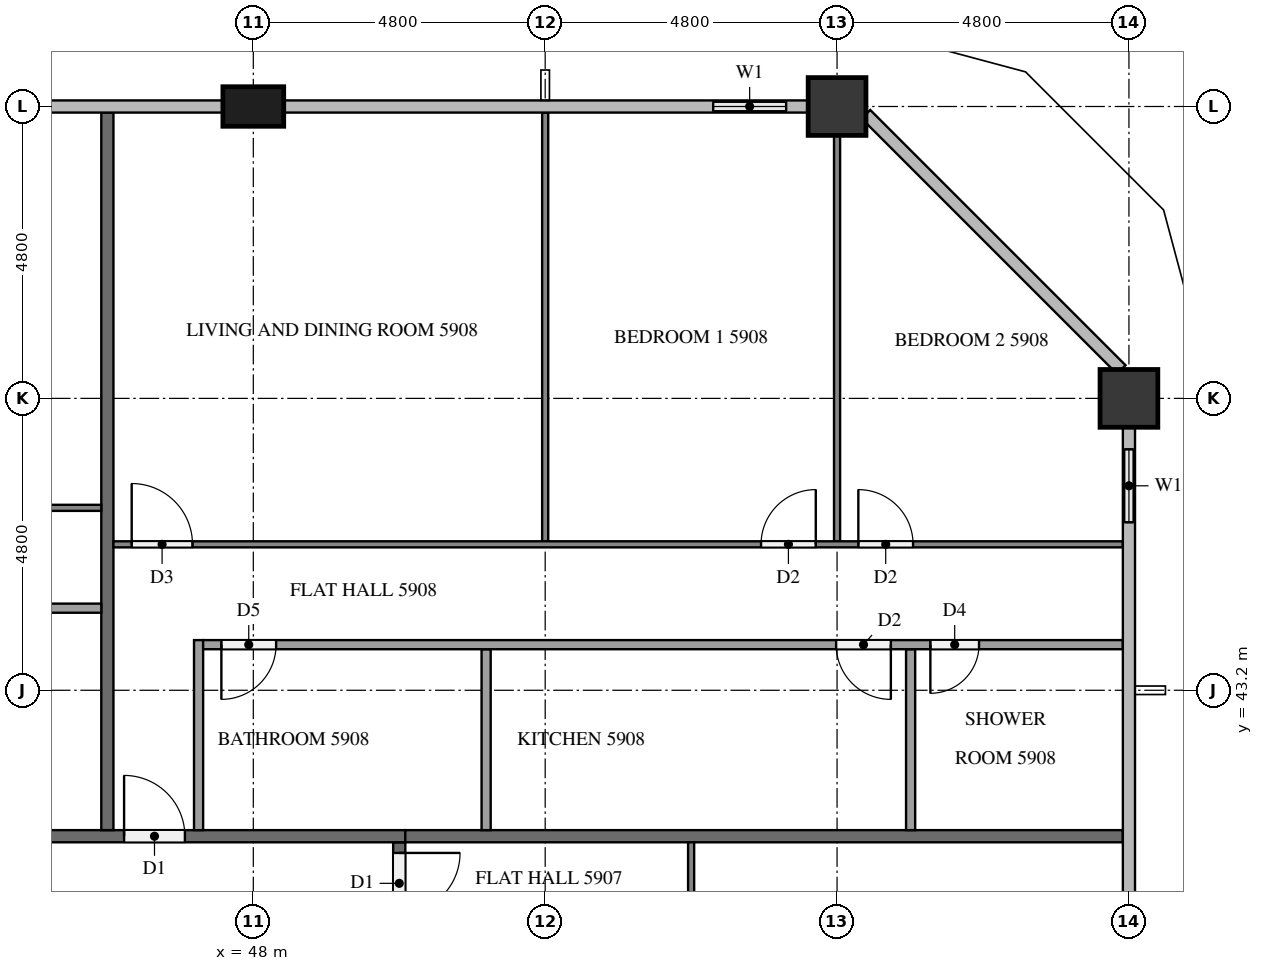
"""IFC4 building model, lengths in metres.
Left out: names, types, materials, properties, quantities, classifications, styles, units other than length and angle.
Written with IfcOpenShell. Run it as: python <this file> out.ifc"""

import sys

from ifc_helpers import new_model, si_unit, direction, frame, frame_2d, origin, origin_2d, place, context, subcontext, project, spatial, rectangle, extrude, element, fill, save


model = new_model("IFC4")
c1 = context("Model", 3, precision=1e-05, world=origin(), true_north=direction((0.0, 1.0)))
c2 = subcontext(c1, "Body", "Model", "MODEL_VIEW")
j1 = project(units=[si_unit("LENGTHUNIT", "METRE"), si_unit("PLANEANGLEUNIT", "RADIAN")], contexts=[c1])
p1 = place(None, origin())
s1 = spatial("IfcSite", under=j1, at=p1, CompositionType="ELEMENT")
p2 = place(p1, origin())
s2 = spatial("IfcBuilding", under=s1, at=p2, CompositionType="ELEMENT")
p3 = place(p2, frame((0.0, 0.0, 226.3)))
s3 = spatial("IfcBuildingStorey", under=s2, at=p3, CompositionType="ELEMENT", Elevation=226.3)
for number, where, z_axis, x_axis in (
    (1, (62.4, 48.0, 0.0), (0.0, 0.0, 1.0), (1.0, 0.0, 0.0)),
    (2, (57.6, 52.8, 0.0), (0.0, 0.0, 1.0), (1.0, 0.0, 0.0)),
):
    element("IfcColumn", number, at=place(p3, frame(where, z_axis=z_axis, x_axis=x_axis)), inside=s3, PredefinedType="COLUMN", context=c2, shape_type="SweptSolid", body=[
        extrude(rectangle(XDim=0.95, YDim=0.95, at=origin_2d()), origin(), (0.0, 0.0, 1.0), 3.2),
    ])
p4 = place(p3, frame((48.0, 52.8, 0.0), z_axis=(0.0, 0.0, 1.0), x_axis=(1.0, 0.0, 0.0)))
e3 = element("IfcColumn", 3, at=p4, inside=s3, PredefinedType="COLUMN", context=c2, shape_type="SweptSolid", body=[
    extrude(rectangle(XDim=1.0, YDim=0.65, at=origin_2d()), origin(), (0.0, 0.0, 1.0), 3.2),
])
p5 = place(p3, frame((62.4, 45.6, 0.0), z_axis=(0.0, 0.0, 1.0), x_axis=(0.0, 1.0, 0.0)))
e4 = element("IfcWall", 4, at=p5, inside=s3, PredefinedType="SOLIDWALL", context=c2, shape_type="SweptSolid", body=[
    extrude(rectangle(XDim=1.925, YDim=0.15, at=frame_2d((0.962, 0.0))), origin(), (0.0, 0.0, 1.0), 3.2),
])
p6 = place(p5, frame((0.363, 0.0, 0.9)))
e5 = element("IfcOpeningElement", 5, at=p6, cuts=e4, PredefinedType="OPENING", context=c2, shape_type="SweptSolid", body=[
    extrude(rectangle(XDim=1.2, YDim=1.4, at=frame_2d((0.6, 0.7))), frame((0.0, 0.085, 0.0), z_axis=(0.0, -1.0, 0.0), x_axis=(1.0, 0.0, 0.0)), (0.0, 0.0, 1.0), 0.17),
])
p7 = place(p3, frame((57.125, 52.8, 0.0), z_axis=(0.0, 0.0, 1.0), x_axis=(-1.0, 0.0, 0.0)))
e6 = element("IfcWall", 6, at=p7, inside=s3, PredefinedType="SOLIDWALL", context=c2, shape_type="SweptSolid", body=[
    extrude(rectangle(XDim=1.925, YDim=0.15, at=frame_2d((0.962, 0.0))), origin(), (0.0, 0.0, 1.0), 3.2),
])
p8 = place(p7, frame((0.363, 0.0, 0.9)))
e7 = element("IfcOpeningElement", 7, at=p8, cuts=e6, PredefinedType="OPENING", context=c2, shape_type="SweptSolid", body=[
    extrude(rectangle(XDim=1.2, YDim=1.4, at=frame_2d((0.6, 0.7))), frame((0.0, 0.085, 0.0), z_axis=(0.0, -1.0, 0.0), x_axis=(1.0, 0.0, 0.0)), (0.0, 0.0, 1.0), 0.17),
])
p9 = place(p3, frame((50.4, 40.7, 0.0), z_axis=(0.0, 0.0, 1.0), x_axis=(0.0, -1.0, 0.0)))
e8 = element("IfcWall", 8, at=p9, inside=s3, PredefinedType="PARTITIONING", context=c2, shape_type="SweptSolid", body=[
    extrude(rectangle(XDim=28.6, YDim=0.2, at=frame_2d((14.3, 0.0))), origin(), (0.0, 0.0, 1.0), 3.2),
])
p10 = place(p9, frame((21.775, 0.0, 0.0)))
e9 = element("IfcOpeningElement", 9, at=p10, cuts=e8, PredefinedType="OPENING", context=c2, shape_type="SweptSolid", body=[
    extrude(rectangle(XDim=1.0, YDim=2.1, at=frame_2d((0.5, 1.05))), frame((0.0, 0.11, 0.0), z_axis=(0.0, -1.0, 0.0), x_axis=(1.0, 0.0, 0.0)), (0.0, 0.0, 1.0), 0.22),
])
p11 = place(p9, frame((7.375, 0.0, 0.0)))
e10 = element("IfcOpeningElement", 10, at=p11, cuts=e8, PredefinedType="OPENING", context=c2, shape_type="SweptSolid", body=[
    extrude(rectangle(XDim=1.0, YDim=2.1, at=frame_2d((0.5, 1.05))), frame((0.0, 0.11, 0.0), z_axis=(0.0, -1.0, 0.0), x_axis=(1.0, 0.0, 0.0)), (0.0, 0.0, 1.0), 0.22),
])
p12 = place(p9, frame((0.175, 0.0, 0.0)))
e11 = element("IfcOpeningElement", 11, at=p12, cuts=e8, PredefinedType="OPENING", context=c2, shape_type="SweptSolid", body=[
    extrude(rectangle(XDim=1.0, YDim=2.1, at=frame_2d((0.5, 1.05))), frame((0.0, 0.11, 0.0), z_axis=(0.0, -1.0, 0.0), x_axis=(1.0, 0.0, 0.0)), (0.0, 0.0, 1.0), 0.22),
])
p13 = place(p3, frame((11.9, 40.8, 0.0), z_axis=(0.0, 0.0, 1.0), x_axis=(1.0, 0.0, 0.0)))
e12 = element("IfcWall", 12, at=p13, inside=s3, PredefinedType="PARTITIONING", context=c2, shape_type="SweptSolid", body=[
    extrude(rectangle(XDim=38.6, YDim=0.2, at=frame_2d((19.3, 0.0))), origin(), (0.0, 0.0, 1.0), 3.2),
])
p14 = place(p13, frame((33.975, 0.0, 0.0)))
e13 = element("IfcOpeningElement", 13, at=p14, cuts=e12, PredefinedType="OPENING", context=c2, shape_type="SweptSolid", body=[
    extrude(rectangle(XDim=1.0, YDim=2.1, at=frame_2d((0.5, 1.05))), frame((0.0, 0.11, 0.0), z_axis=(0.0, -1.0, 0.0), x_axis=(1.0, 0.0, 0.0)), (0.0, 0.0, 1.0), 0.22),
])
p15 = place(p13, frame((14.725, 0.0, 0.0)))
e14 = element("IfcOpeningElement", 14, at=p15, cuts=e12, PredefinedType="OPENING", context=c2, shape_type="SweptSolid", body=[
    extrude(rectangle(XDim=1.1, YDim=2.1, at=frame_2d((0.55, 1.05))), frame((0.0, 0.11, 0.0), z_axis=(0.0, -1.0, 0.0), x_axis=(1.0, 0.0, 0.0)), (0.0, 0.0, 1.0), 0.22),
])
p16 = place(p13, frame((7.575, 0.0, 0.0)))
e15 = element("IfcOpeningElement", 15, at=p16, cuts=e12, PredefinedType="OPENING", context=c2, shape_type="SweptSolid", body=[
    extrude(rectangle(XDim=1.0, YDim=2.1, at=frame_2d((0.5, 1.05))), frame((0.0, 0.11, 0.0), z_axis=(0.0, -1.0, 0.0), x_axis=(1.0, 0.0, 0.0)), (0.0, 0.0, 1.0), 0.22),
])
p17 = place(p13, frame((6.025, 0.0, 0.0)))
e16 = element("IfcOpeningElement", 16, at=p17, cuts=e12, PredefinedType="OPENING", context=c2, shape_type="SweptSolid", body=[
    extrude(rectangle(XDim=1.0, YDim=2.1, at=frame_2d((0.5, 1.05))), frame((0.0, 0.11, 0.0), z_axis=(0.0, -1.0, 0.0), x_axis=(1.0, 0.0, 0.0)), (0.0, 0.0, 1.0), 0.22),
])
for number, where, z_axis, x_axis in (
    (17, (50.5, 40.8, 0.0), (0.0, 0.0, 1.0), (1.0, 0.0, 0.0)),
    (18, (45.6, 52.7, 0.0), (0.0, 0.0, 1.0), (0.0, -1.0, 0.0)),
):
    element("IfcWall", number, at=place(p3, frame(where, z_axis=z_axis, x_axis=x_axis)), inside=s3, PredefinedType="PARTITIONING", context=c2, shape_type="SweptSolid", body=[
        extrude(rectangle(XDim=11.8, YDim=0.2, at=frame_2d((5.9, 0.0))), origin(), (0.0, 0.0, 1.0), 3.2),
    ])
p18 = place(p3, frame((55.2, 40.7, 0.0), z_axis=(0.0, 0.0, 1.0), x_axis=(0.0, -1.0, 0.0)))
e19 = element("IfcWall", 19, at=p18, inside=s3, PredefinedType="PARTITIONING", context=c2, shape_type="SweptSolid", body=[
    extrude(rectangle(XDim=7.0, YDim=0.1, at=frame_2d((3.5, 0.0))), origin(), (0.0, 0.0, 1.0), 3.2),
])
p19 = place(p18, frame((5.7, 0.0, 0.0)))
e20 = element("IfcOpeningElement", 20, at=p19, cuts=e19, PredefinedType="OPENING", context=c2, shape_type="SweptSolid", body=[
    extrude(rectangle(XDim=1.0, YDim=2.1, at=frame_2d((0.5, 1.05))), frame((0.0, 0.06, 0.0), z_axis=(0.0, -1.0, 0.0), x_axis=(1.0, 0.0, 0.0)), (0.0, 0.0, 1.0), 0.12),
])
p20 = place(p3, frame((52.8, 45.65, 0.0), z_axis=(0.0, 0.0, 1.0), x_axis=(0.0, 1.0, 0.0)))
e21 = element("IfcWall", 21, at=p20, inside=s3, PredefinedType="PARTITIONING", context=c2, shape_type="SweptSolid", body=[
    extrude(rectangle(XDim=7.05, YDim=0.1, at=frame_2d((3.525, 0.0))), origin(), (0.0, 0.0, 1.0), 3.2),
])
p21 = place(p3, frame((57.6, 45.65, 0.0), z_axis=(0.0, 0.0, 1.0), x_axis=(0.0, 1.0, 0.0)))
e22 = element("IfcWall", 22, at=p21, inside=s3, PredefinedType="PARTITIONING", context=c2, shape_type="SweptSolid", body=[
    extrude(rectangle(XDim=6.675, YDim=0.1, at=frame_2d((3.337, 0.0))), origin(), (0.0, 0.0, 1.0), 3.2),
])
p22 = place(p3, frame((45.7, 45.6, 0.0), z_axis=(0.0, 0.0, 1.0), x_axis=(1.0, 0.0, 0.0)))
e23 = element("IfcWall", 23, at=p22, inside=s3, PredefinedType="PARTITIONING", context=c2, shape_type="SweptSolid", body=[
    extrude(rectangle(XDim=16.6, YDim=0.1, at=frame_2d((8.3, 0.0))), origin(), (0.0, 0.0, 1.0), 3.2),
])
p23 = place(p22, frame((0.3, 0.0, 0.0)))
e24 = element("IfcOpeningElement", 24, at=p23, cuts=e23, PredefinedType="OPENING", context=c2, shape_type="SweptSolid", body=[
    extrude(rectangle(XDim=1.0, YDim=2.1, at=frame_2d((0.5, 1.05))), frame((0.0, 0.06, 0.0), z_axis=(0.0, -1.0, 0.0), x_axis=(1.0, 0.0, 0.0)), (0.0, 0.0, 1.0), 0.12),
])
p24 = place(p22, frame((10.65, 0.0, 0.0)))
e25 = element("IfcOpeningElement", 25, at=p24, cuts=e23, PredefinedType="OPENING", context=c2, shape_type="SweptSolid", body=[
    extrude(rectangle(XDim=0.9, YDim=2.1, at=frame_2d((0.45, 1.05))), frame((0.0, 0.06, 0.0), z_axis=(0.0, -1.0, 0.0), x_axis=(1.0, 0.0, 0.0)), (0.0, 0.0, 1.0), 0.12),
])
p25 = place(p22, frame((12.25, 0.0, 0.0)))
e26 = element("IfcOpeningElement", 26, at=p25, cuts=e23, PredefinedType="OPENING", context=c2, shape_type="SweptSolid", body=[
    extrude(rectangle(XDim=0.9, YDim=2.1, at=frame_2d((0.45, 1.05))), frame((0.0, 0.06, 0.0), z_axis=(0.0, -1.0, 0.0), x_axis=(1.0, 0.0, 0.0)), (0.0, 0.0, 1.0), 0.12),
])
for number, where, z_axis, x_axis in (
    (27, (51.829, 40.9, 0.0), (0.0, 0.0, 1.0), (0.0, 1.0, 0.0)),
    (28, (58.81, 40.9, 0.0), (0.0, 0.0, 1.0), (0.0, 1.0, 0.0)),
):
    element("IfcWall", number, at=place(p3, frame(where, z_axis=z_axis, x_axis=x_axis)), inside=s3, PredefinedType="PARTITIONING", context=c2, shape_type="SweptSolid", body=[
        extrude(rectangle(XDim=2.975, YDim=0.15, at=frame_2d((1.488, 0.0))), origin(), (0.0, 0.0, 1.0), 3.2),
    ])
p26 = place(p3, frame((47.1, 40.9, 0.0), z_axis=(0.0, 0.0, 1.0), x_axis=(0.0, 1.0, 0.0)))
e29 = element("IfcWall", 29, at=p26, inside=s3, PredefinedType="PARTITIONING", context=c2, shape_type="SweptSolid", body=[
    extrude(rectangle(XDim=3.125, YDim=0.15, at=frame_2d((1.562, 0.0))), origin(), (0.0, 0.0, 1.0), 3.2),
])
p27 = place(p3, frame((62.3, 43.95, 0.0), z_axis=(0.0, 0.0, 1.0), x_axis=(-1.0, 0.0, 0.0)))
e30 = element("IfcWall", 30, at=p27, inside=s3, PredefinedType="PARTITIONING", context=c2, shape_type="SweptSolid", body=[
    extrude(rectangle(XDim=15.125, YDim=0.15, at=frame_2d((7.562, 0.0))), origin(), (0.0, 0.0, 1.0), 3.2),
])
p28 = place(p27, frame((13.925, 0.0, 0.0)))
e31 = element("IfcOpeningElement", 31, at=p28, cuts=e30, PredefinedType="OPENING", context=c2, shape_type="SweptSolid", body=[
    extrude(rectangle(XDim=0.9, YDim=2.1, at=frame_2d((0.45, 1.05))), frame((0.0, 0.085, 0.0), z_axis=(0.0, -1.0, 0.0), x_axis=(1.0, 0.0, 0.0)), (0.0, 0.0, 1.0), 0.17),
])
p29 = place(p27, frame((3.815, 0.0, 0.0)))
e32 = element("IfcOpeningElement", 32, at=p29, cuts=e30, PredefinedType="OPENING", context=c2, shape_type="SweptSolid", body=[
    extrude(rectangle(XDim=0.9, YDim=2.1, at=frame_2d((0.45, 1.05))), frame((0.0, 0.085, 0.0), z_axis=(0.0, -1.0, 0.0), x_axis=(1.0, 0.0, 0.0)), (0.0, 0.0, 1.0), 0.17),
])
p30 = place(p27, frame((2.365, 0.0, 0.0)))
e33 = element("IfcOpeningElement", 33, at=p30, cuts=e30, PredefinedType="OPENING", context=c2, shape_type="SweptSolid", body=[
    extrude(rectangle(XDim=0.8, YDim=2.1, at=frame_2d((0.4, 1.05))), frame((0.0, 0.085, 0.0), z_axis=(0.0, -1.0, 0.0), x_axis=(1.0, 0.0, 0.0)), (0.0, 0.0, 1.0), 0.17),
])
p31 = place(p3, frame((26.5, 46.2, 0.0), z_axis=(0.0, 0.0, 1.0), x_axis=(1.0, 0.0, 0.0)))
e34 = element("IfcWall", 34, at=p31, inside=s3, PredefinedType="PARTITIONING", context=c2, shape_type="SweptSolid", body=[
    extrude(rectangle(XDim=19.0, YDim=0.1, at=frame_2d((9.5, 0.0))), origin(), (0.0, 0.0, 1.0), 3.2),
])
p32 = place(p31, frame((3.45, 0.0, 0.0)))
e35 = element("IfcOpeningElement", 35, at=p32, cuts=e34, PredefinedType="OPENING", context=c2, shape_type="SweptSolid", body=[
    extrude(rectangle(XDim=0.9, YDim=2.1, at=frame_2d((0.45, 1.05))), frame((0.0, 0.06, 0.0), z_axis=(0.0, -1.0, 0.0), x_axis=(1.0, 0.0, 0.0)), (0.0, 0.0, 1.0), 0.12),
])
p33 = place(p31, frame((5.05, 0.0, 0.0)))
e36 = element("IfcOpeningElement", 36, at=p33, cuts=e34, PredefinedType="OPENING", context=c2, shape_type="SweptSolid", body=[
    extrude(rectangle(XDim=1.0, YDim=2.1, at=frame_2d((0.5, 1.05))), frame((0.0, 0.06, 0.0), z_axis=(0.0, -1.0, 0.0), x_axis=(1.0, 0.0, 0.0)), (0.0, 0.0, 1.0), 0.12),
])
p34 = place(p31, frame((13.05, 0.0, 0.0)))
e37 = element("IfcOpeningElement", 37, at=p34, cuts=e34, PredefinedType="OPENING", context=c2, shape_type="SweptSolid", body=[
    extrude(rectangle(XDim=0.9, YDim=2.1, at=frame_2d((0.45, 1.05))), frame((0.0, 0.06, 0.0), z_axis=(0.0, -1.0, 0.0), x_axis=(1.0, 0.0, 0.0)), (0.0, 0.0, 1.0), 0.12),
])
p35 = place(p31, frame((14.65, 0.0, 0.0)))
e38 = element("IfcOpeningElement", 38, at=p35, cuts=e34, PredefinedType="OPENING", context=c2, shape_type="SweptSolid", body=[
    extrude(rectangle(XDim=0.9, YDim=2.1, at=frame_2d((0.45, 1.05))), frame((0.0, 0.06, 0.0), z_axis=(0.0, -1.0, 0.0), x_axis=(1.0, 0.0, 0.0)), (0.0, 0.0, 1.0), 0.12),
])
p36 = place(p3, frame((45.5, 44.55, 0.0), z_axis=(0.0, 0.0, 1.0), x_axis=(-1.0, 0.0, 0.0)))
e39 = element("IfcWall", 39, at=p36, inside=s3, PredefinedType="PARTITIONING", context=c2, shape_type="SweptSolid", body=[
    extrude(rectangle(XDim=17.525, YDim=0.15, at=frame_2d((8.762, 0.0))), origin(), (0.0, 0.0, 1.0), 3.2),
])
p37 = place(p36, frame((14.564, 0.0, 0.0)))
e40 = element("IfcOpeningElement", 40, at=p37, cuts=e39, PredefinedType="OPENING", context=c2, shape_type="SweptSolid", body=[
    extrude(rectangle(XDim=0.8, YDim=2.1, at=frame_2d((0.4, 1.05))), frame((0.0, 0.085, 0.0), z_axis=(0.0, -1.0, 0.0), x_axis=(1.0, 0.0, 0.0)), (0.0, 0.0, 1.0), 0.17),
])
p38 = place(p36, frame((13.114, 0.0, 0.0)))
e41 = element("IfcOpeningElement", 41, at=p38, cuts=e39, PredefinedType="OPENING", context=c2, shape_type="SweptSolid", body=[
    extrude(rectangle(XDim=0.8, YDim=2.1, at=frame_2d((0.4, 1.05))), frame((0.0, 0.085, 0.0), z_axis=(0.0, -1.0, 0.0), x_axis=(1.0, 0.0, 0.0)), (0.0, 0.0, 1.0), 0.17),
])
p39 = place(p36, frame((6.897, 0.0, 0.0)))
e42 = element("IfcOpeningElement", 42, at=p39, cuts=e39, PredefinedType="OPENING", context=c2, shape_type="SweptSolid", body=[
    extrude(rectangle(XDim=0.9, YDim=2.1, at=frame_2d((0.45, 1.05))), frame((0.0, 0.085, 0.0), z_axis=(0.0, -1.0, 0.0), x_axis=(1.0, 0.0, 0.0)), (0.0, 0.0, 1.0), 0.17),
])
p40 = place(p36, frame((5.347, 0.0, 0.0)))
e43 = element("IfcOpeningElement", 43, at=p40, cuts=e39, PredefinedType="OPENING", context=c2, shape_type="SweptSolid", body=[
    extrude(rectangle(XDim=0.9, YDim=2.1, at=frame_2d((0.45, 1.05))), frame((0.0, 0.085, 0.0), z_axis=(0.0, -1.0, 0.0), x_axis=(1.0, 0.0, 0.0)), (0.0, 0.0, 1.0), 0.17),
])
p41 = place(p6, origin())
e44 = element("IfcWindow", 44, at=p41, inside=s3, PartitioningType="SINGLE_PANEL", PredefinedType="WINDOW", context=c2, shape_type="SweptSolid", body=[
    extrude(rectangle(XDim=1.2, YDim=1.4, at=frame_2d((0.6, 0.7))), frame((0.0, 0.03, 0.0), z_axis=(0.0, -1.0, 0.0), x_axis=(1.0, 0.0, 0.0)), (0.0, 0.0, 1.0), 0.06),
])
fill(e5, e44)
p42 = place(p8, origin())
e45 = element("IfcWindow", 45, at=p42, inside=s3, PartitioningType="SINGLE_PANEL", PredefinedType="WINDOW", context=c2, shape_type="SweptSolid", body=[
    extrude(rectangle(XDim=1.2, YDim=1.4, at=frame_2d((0.6, 0.7))), frame((0.0, 0.03, 0.0), z_axis=(0.0, -1.0, 0.0), x_axis=(1.0, 0.0, 0.0)), (0.0, 0.0, 1.0), 0.06),
])
fill(e7, e45)
p43 = place(p12, origin())
e46 = element("IfcDoor", 46, at=p43, inside=s3, OperationType="SINGLE_SWING_LEFT", PredefinedType="DOOR", context=c2, shape_type="SweptSolid", body=[
    extrude(rectangle(XDim=1.0, YDim=2.1, at=frame_2d((0.5, 1.05))), frame((0.0, 0.025, 0.0), z_axis=(0.0, -1.0, 0.0), x_axis=(1.0, 0.0, 0.0)), (0.0, 0.0, 1.0), 0.05),
])
fill(e11, e46)
p44 = place(p14, origin())
e47 = element("IfcDoor", 47, at=p44, inside=s3, OperationType="SINGLE_SWING_LEFT", PredefinedType="DOOR", context=c2, shape_type="SweptSolid", body=[
    extrude(rectangle(XDim=1.0, YDim=2.1, at=frame_2d((0.5, 1.05))), frame((0.0, 0.025, 0.0), z_axis=(0.0, -1.0, 0.0), x_axis=(1.0, 0.0, 0.0)), (0.0, 0.0, 1.0), 0.05),
])
fill(e13, e47)
p45 = place(p23, origin())
e48 = element("IfcDoor", 48, at=p45, inside=s3, OperationType="SINGLE_SWING_LEFT", PredefinedType="DOOR", context=c2, shape_type="SweptSolid", body=[
    extrude(rectangle(XDim=1.0, YDim=2.1, at=frame_2d((0.5, 1.05))), frame((0.0, 0.025, 0.0), z_axis=(0.0, -1.0, 0.0), x_axis=(1.0, 0.0, 0.0)), (0.0, 0.0, 1.0), 0.05),
])
fill(e24, e48)
p46 = place(p24, origin())
e49 = element("IfcDoor", 49, at=p46, inside=s3, OperationType="SINGLE_SWING_RIGHT", PredefinedType="DOOR", context=c2, shape_type="SweptSolid", body=[
    extrude(rectangle(XDim=0.9, YDim=2.1, at=frame_2d((0.45, 1.05))), frame((0.0, 0.025, 0.0), z_axis=(0.0, -1.0, 0.0), x_axis=(1.0, 0.0, 0.0)), (0.0, 0.0, 1.0), 0.05),
])
fill(e25, e49)
p47 = place(p25, origin())
e50 = element("IfcDoor", 50, at=p47, inside=s3, OperationType="SINGLE_SWING_LEFT", PredefinedType="DOOR", context=c2, shape_type="SweptSolid", body=[
    extrude(rectangle(XDim=0.9, YDim=2.1, at=frame_2d((0.45, 1.05))), frame((0.0, 0.025, 0.0), z_axis=(0.0, -1.0, 0.0), x_axis=(1.0, 0.0, 0.0)), (0.0, 0.0, 1.0), 0.05),
])
fill(e26, e50)
p48 = place(p28, origin())
e51 = element("IfcDoor", 51, at=p48, inside=s3, OperationType="SINGLE_SWING_RIGHT", PredefinedType="DOOR", context=c2, shape_type="SweptSolid", body=[
    extrude(rectangle(XDim=0.9, YDim=2.1, at=frame_2d((0.45, 1.05))), frame((0.0, 0.025, 0.0), z_axis=(0.0, -1.0, 0.0), x_axis=(1.0, 0.0, 0.0)), (0.0, 0.0, 1.0), 0.05),
])
fill(e31, e51)
p49 = place(p29, origin())
e52 = element("IfcDoor", 52, at=p49, inside=s3, OperationType="SINGLE_SWING_LEFT", PredefinedType="DOOR", context=c2, shape_type="SweptSolid", body=[
    extrude(rectangle(XDim=0.9, YDim=2.1, at=frame_2d((0.45, 1.05))), frame((0.0, 0.025, 0.0), z_axis=(0.0, -1.0, 0.0), x_axis=(1.0, 0.0, 0.0)), (0.0, 0.0, 1.0), 0.05),
])
fill(e32, e52)
p50 = place(p30, origin())
e53 = element("IfcDoor", 53, at=p50, inside=s3, OperationType="SINGLE_SWING_RIGHT", PredefinedType="DOOR", context=c2, shape_type="SweptSolid", body=[
    extrude(rectangle(XDim=0.8, YDim=2.1, at=frame_2d((0.4, 1.05))), frame((0.0, 0.025, 0.0), z_axis=(0.0, -1.0, 0.0), x_axis=(1.0, 0.0, 0.0)), (0.0, 0.0, 1.0), 0.05),
])
fill(e33, e53)
save(model, sys.argv[1])
